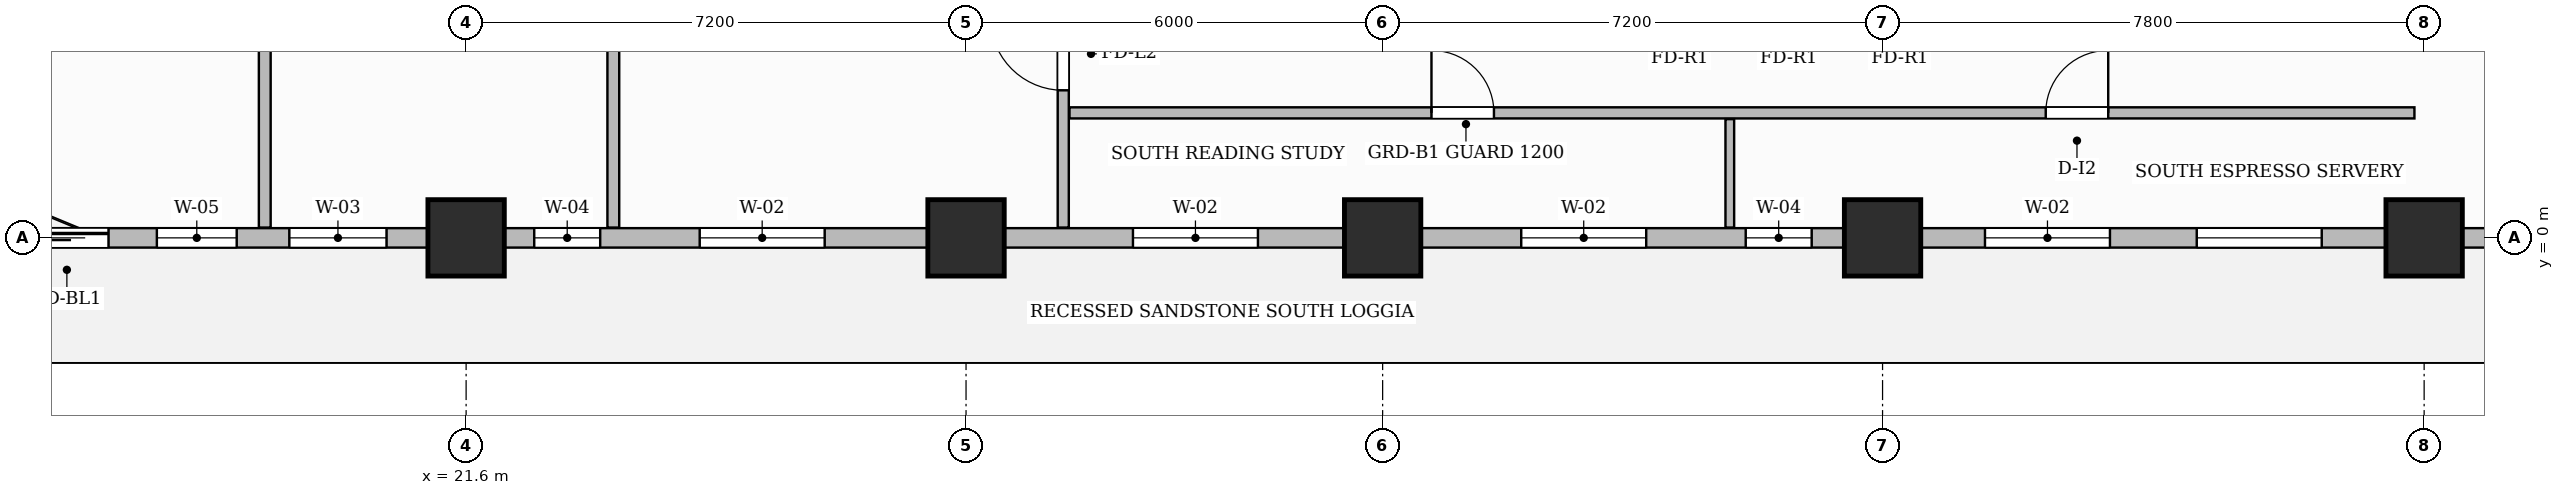
"""IFC4 building model, lengths in metres.
Left out: names, types, materials, properties, quantities, classifications, styles, units other than length and angle.
Written with IfcOpenShell. Run it as: python <this file> out.ifc"""

import sys

from ifc_helpers import new_model, si_unit, direction, frame, frame_2d, origin, origin_2d, place, context, subcontext, project, spatial, rectangle, extrude, source, transform, mapped, element, fill, save


model = new_model("IFC4")
c1 = context("Model", 3, precision=1e-05, world=origin(), true_north=direction((0.0, 1.0)))
c2 = subcontext(c1, "Body", "Model", "MODEL_VIEW")
j1 = project(units=[si_unit("LENGTHUNIT", "METRE"), si_unit("PLANEANGLEUNIT", "RADIAN")], contexts=[c1])
p1 = place(None, origin())
s1 = spatial("IfcSite", under=j1, at=p1, CompositionType="ELEMENT")
p2 = place(p1, origin())
s2 = spatial("IfcBuilding", under=s1, at=p2, CompositionType="ELEMENT")
p3 = place(p2, frame((0.0, 0.0, 95.3)))
s3 = spatial("IfcBuildingStorey", under=s2, at=p3, CompositionType="ELEMENT", Elevation=95.3)
m1 = source(origin(), c2, "Body", "SweptSolid", [
    extrude(rectangle(XDim=1.1, YDim=1.1, at=origin_2d()), origin(), (0.0, 0.0, 1.0), 3.7),
])
for number, where, z_axis, x_axis in (
    (1, (21.6, 0.0, 0.0), (0.0, 0.0, 1.0), (1.0, 0.0, 0.0)),
    (2, (28.8, 0.0, 0.0), (0.0, 0.0, 1.0), (1.0, 0.0, 0.0)),
    (3, (34.8, 0.0, 0.0), (0.0, 0.0, 1.0), (1.0, 0.0, 0.0)),
    (4, (42.0, 0.0, 0.0), (0.0, 0.0, 1.0), (1.0, 0.0, 0.0)),
    (5, (49.8, 0.0, 0.0), (0.0, 0.0, 1.0), (1.0, 0.0, 0.0)),
):
    element("IfcColumn", number, at=place(p3, frame(where, z_axis=z_axis, x_axis=x_axis)), inside=s3, PredefinedType="COLUMN", context=c2, shape_type="MappedRepresentation", body=[
        mapped(m1, transform((0.0, 0.0, 0.0), scale=1.0)),
    ])
p4 = place(p3, frame((30.2, 0.148, 0.0), z_axis=(0.0, 0.0, 1.0), x_axis=(0.0, 1.0, 0.0)))
e6 = element("IfcWall", 6, at=p4, inside=s3, PredefinedType="PARTITIONING", context=c2, shape_type="SweptSolid", body=[
    extrude(rectangle(XDim=8.912, YDim=0.16, at=frame_2d((4.456, 0.0))), origin(), (0.0, 0.0, 1.0), 3.45),
])
p5 = place(p4, frame((1.977, 0.0, 0.0)))
e7 = element("IfcOpeningElement", 7, at=p5, cuts=e6, PredefinedType="OPENING", context=c2, shape_type="SweptSolid", body=[
    extrude(rectangle(XDim=1.05, YDim=2.15, at=frame_2d((0.525, 1.075))), frame((0.0, 0.09, 0.0), z_axis=(0.0, -1.0, 0.0), x_axis=(1.0, 0.0, 0.0)), (0.0, 0.0, 1.0), 0.18),
])
p6 = place(p3, frame((30.29, 1.8, 0.0), z_axis=(0.0, 0.0, 1.0), x_axis=(1.0, 0.0, 0.0)))
e8 = element("IfcWall", 8, at=p6, inside=s3, PredefinedType="PARTITIONING", context=c2, shape_type="SweptSolid", body=[
    extrude(rectangle(XDim=19.37, YDim=0.16, at=frame_2d((9.685, 0.0))), origin(), (0.0, 0.0, 1.0), 3.45),
])
p7 = place(p6, frame((5.213, 0.0, 0.0)))
e9 = element("IfcOpeningElement", 9, at=p7, cuts=e8, PredefinedType="OPENING", context=c2, shape_type="SweptSolid", body=[
    extrude(rectangle(XDim=0.9, YDim=2.15, at=frame_2d((0.45, 1.075))), frame((0.0, 0.09, 0.0), z_axis=(0.0, -1.0, 0.0), x_axis=(1.0, 0.0, 0.0)), (0.0, 0.0, 1.0), 0.18),
])
p8 = place(p6, frame((14.06, 0.0, 0.0)))
e10 = element("IfcOpeningElement", 10, at=p8, cuts=e8, PredefinedType="OPENING", context=c2, shape_type="SweptSolid", body=[
    extrude(rectangle(XDim=0.9, YDim=2.15, at=frame_2d((0.45, 1.075))), frame((0.0, 0.09, 0.0), z_axis=(0.0, -1.0, 0.0), x_axis=(1.0, 0.0, 0.0)), (0.0, 0.0, 1.0), 0.18),
])
p9 = place(p3, frame((39.8, 0.148, 0.0), z_axis=(0.0, 0.0, 1.0), x_axis=(0.0, 1.0, 0.0)))
e11 = element("IfcWall", 11, at=p9, inside=s3, PredefinedType="PARTITIONING", context=c2, shape_type="SweptSolid", body=[
    extrude(rectangle(XDim=1.562, YDim=0.125, at=frame_2d((0.781, 0.0))), origin(), (0.0, 0.0, 1.0), 3.45),
])
for number, where, z_axis, x_axis in (
    (12, (18.7, 0.148, 0.0), (0.0, 0.0, 1.0), (0.0, 1.0, 0.0)),
    (13, (23.72, 0.148, 0.0), (0.0, 0.0, 1.0), (0.0, 1.0, 0.0)),
):
    element("IfcWall", number, at=place(p3, frame(where, z_axis=z_axis, x_axis=x_axis)), inside=s3, PredefinedType="PARTITIONING", context=c2, shape_type="SweptSolid", body=[
        extrude(rectangle(XDim=8.912, YDim=0.17, at=frame_2d((4.456, 0.0))), origin(), (0.0, 0.0, 1.0), 3.45),
    ])
p10 = place(p3, frame((14.4, 0.0, 0.0), z_axis=(0.0, 0.0, 1.0), x_axis=(1.0, 0.0, 0.0)))
e14 = element("IfcWall", 14, at=p10, inside=s3, PredefinedType="SOLIDWALL", context=c2, shape_type="SweptSolid", body=[
    extrude(rectangle(XDim=43.2, YDim=0.28, at=frame_2d((21.6, 0.0))), origin(), (0.0, 0.0, 1.0), 2.885),
])
p11 = place(p10, frame((0.85, 0.0, 0.0)))
e15 = element("IfcOpeningElement", 15, at=p11, cuts=e14, PredefinedType="OPENING", context=c2, shape_type="SweptSolid", body=[
    extrude(rectangle(XDim=1.2, YDim=2.2, at=frame_2d((0.6, 1.1))), frame((0.0, 0.15, 0.0), z_axis=(0.0, -1.0, 0.0), x_axis=(1.0, 0.0, 0.0)), (0.0, 0.0, 1.0), 0.3),
])
p12 = place(p10, frame((2.746, 0.0, 0.8)))
e16 = element("IfcOpeningElement", 16, at=p12, cuts=e14, PredefinedType="OPENING", context=c2, shape_type="SweptSolid", body=[
    extrude(rectangle(XDim=1.15, YDim=1.8, at=frame_2d((0.575, 0.9))), frame((0.0, 0.15, 0.0), z_axis=(0.0, -1.0, 0.0), x_axis=(1.0, 0.0, 0.0)), (0.0, 0.0, 1.0), 0.3),
])
p13 = place(p10, frame((4.654, 0.0, 0.8)))
e17 = element("IfcOpeningElement", 17, at=p13, cuts=e14, PredefinedType="OPENING", context=c2, shape_type="SweptSolid", body=[
    extrude(rectangle(XDim=1.4, YDim=1.85, at=frame_2d((0.7, 0.925))), frame((0.0, 0.15, 0.0), z_axis=(0.0, -1.0, 0.0), x_axis=(1.0, 0.0, 0.0)), (0.0, 0.0, 1.0), 0.3),
])
p14 = place(p10, frame((8.181, 0.0, 0.8)))
e18 = element("IfcOpeningElement", 18, at=p14, cuts=e14, PredefinedType="OPENING", context=c2, shape_type="SweptSolid", body=[
    extrude(rectangle(XDim=0.95, YDim=1.75, at=frame_2d((0.475, 0.875))), frame((0.0, 0.15, 0.0), z_axis=(0.0, -1.0, 0.0), x_axis=(1.0, 0.0, 0.0)), (0.0, 0.0, 1.0), 0.3),
])
p15 = place(p10, frame((10.564, 0.0, 0.8)))
e19 = element("IfcOpeningElement", 19, at=p15, cuts=e14, PredefinedType="OPENING", context=c2, shape_type="SweptSolid", body=[
    extrude(rectangle(XDim=1.8, YDim=1.85, at=frame_2d((0.9, 0.925))), frame((0.0, 0.15, 0.0), z_axis=(0.0, -1.0, 0.0), x_axis=(1.0, 0.0, 0.0)), (0.0, 0.0, 1.0), 0.3),
])
p16 = place(p10, frame((16.804, 0.0, 0.8)))
e20 = element("IfcOpeningElement", 20, at=p16, cuts=e14, PredefinedType="OPENING", context=c2, shape_type="SweptSolid", body=[
    extrude(rectangle(XDim=1.8, YDim=1.85, at=frame_2d((0.9, 0.925))), frame((0.0, 0.15, 0.0), z_axis=(0.0, -1.0, 0.0), x_axis=(1.0, 0.0, 0.0)), (0.0, 0.0, 1.0), 0.3),
])
p17 = place(p10, frame((22.396, 0.0, 0.8)))
e21 = element("IfcOpeningElement", 21, at=p17, cuts=e14, PredefinedType="OPENING", context=c2, shape_type="SweptSolid", body=[
    extrude(rectangle(XDim=1.8, YDim=1.85, at=frame_2d((0.9, 0.925))), frame((0.0, 0.15, 0.0), z_axis=(0.0, -1.0, 0.0), x_axis=(1.0, 0.0, 0.0)), (0.0, 0.0, 1.0), 0.3),
])
p18 = place(p10, frame((25.629, 0.0, 0.8)))
e22 = element("IfcOpeningElement", 22, at=p18, cuts=e14, PredefinedType="OPENING", context=c2, shape_type="SweptSolid", body=[
    extrude(rectangle(XDim=0.95, YDim=1.75, at=frame_2d((0.475, 0.875))), frame((0.0, 0.15, 0.0), z_axis=(0.0, -1.0, 0.0), x_axis=(1.0, 0.0, 0.0)), (0.0, 0.0, 1.0), 0.3),
])
p19 = place(p10, frame((29.075, 0.0, 0.8)))
e23 = element("IfcOpeningElement", 23, at=p19, cuts=e14, PredefinedType="OPENING", context=c2, shape_type="SweptSolid", body=[
    extrude(rectangle(XDim=1.8, YDim=1.85, at=frame_2d((0.9, 0.925))), frame((0.0, 0.15, 0.0), z_axis=(0.0, -1.0, 0.0), x_axis=(1.0, 0.0, 0.0)), (0.0, 0.0, 1.0), 0.3),
])
p20 = place(p10, frame((32.125, 0.0, 0.8)))
e24 = element("IfcOpeningElement", 24, at=p20, cuts=e14, PredefinedType="OPENING", context=c2, shape_type="SweptSolid", body=[
    extrude(rectangle(XDim=1.8, YDim=1.85, at=frame_2d((0.9, 0.925))), frame((0.0, 0.15, 0.0), z_axis=(0.0, -1.0, 0.0), x_axis=(1.0, 0.0, 0.0)), (0.0, 0.0, 1.0), 0.3),
])
p21 = place(p10, frame((36.946, 0.0, 0.8)))
e25 = element("IfcOpeningElement", 25, at=p21, cuts=e14, PredefinedType="OPENING", context=c2, shape_type="SweptSolid", body=[
    extrude(rectangle(XDim=1.8, YDim=1.85, at=frame_2d((0.9, 0.925))), frame((0.0, 0.15, 0.0), z_axis=(0.0, -1.0, 0.0), x_axis=(1.0, 0.0, 0.0)), (0.0, 0.0, 1.0), 0.3),
])
p22 = place(p10, frame((40.054, 0.0, 0.8)))
e26 = element("IfcOpeningElement", 26, at=p22, cuts=e14, PredefinedType="OPENING", context=c2, shape_type="SweptSolid", body=[
    extrude(rectangle(XDim=1.8, YDim=1.85, at=frame_2d((0.9, 0.925))), frame((0.0, 0.15, 0.0), z_axis=(0.0, -1.0, 0.0), x_axis=(1.0, 0.0, 0.0)), (0.0, 0.0, 1.0), 0.3),
])
m2 = source(origin(), c2, "Body", "SweptSolid", [
    extrude(rectangle(XDim=1.05, YDim=2.15, at=frame_2d((0.525, 1.075))), frame((0.0, 0.025, 0.0), z_axis=(0.0, -1.0, 0.0), x_axis=(1.0, 0.0, 0.0)), (0.0, 0.0, 1.0), 0.05),
])
p23 = place(p5, origin())
e27 = element("IfcDoor", 27, at=p23, inside=s3, OperationType="SINGLE_SWING_RIGHT", PredefinedType="DOOR", context=c2, shape_type="MappedRepresentation", body=[
    mapped(m2, transform((0.0, 0.0, 0.0), scale=1.0)),
])
fill(e7, e27)
m3 = source(origin(), c2, "Body", "SweptSolid", [
    extrude(rectangle(XDim=0.9, YDim=2.15, at=frame_2d((0.45, 1.075))), frame((0.0, 0.025, 0.0), z_axis=(0.0, -1.0, 0.0), x_axis=(1.0, 0.0, 0.0)), (0.0, 0.0, 1.0), 0.05),
])
p24 = place(p7, origin())
e28 = element("IfcDoor", 28, at=p24, inside=s3, OperationType="SINGLE_SWING_LEFT", PredefinedType="DOOR", context=c2, shape_type="MappedRepresentation", body=[
    mapped(m3, transform((0.0, 0.0, 0.0), scale=1.0)),
])
fill(e9, e28)
p25 = place(p8, origin())
e29 = element("IfcDoor", 29, at=p25, inside=s3, OperationType="SINGLE_SWING_RIGHT", PredefinedType="DOOR", context=c2, shape_type="MappedRepresentation", body=[
    mapped(m3, transform((0.0, 0.0, 0.0), scale=1.0)),
])
fill(e10, e29)
m4 = source(origin(), c2, "Body", "SweptSolid", [
    extrude(rectangle(XDim=1.2, YDim=2.2, at=frame_2d((0.6, 1.1))), frame((0.0, 0.025, 0.0), z_axis=(0.0, -1.0, 0.0), x_axis=(1.0, 0.0, 0.0)), (0.0, 0.0, 1.0), 0.05),
])
p26 = place(p11, origin())
e30 = element("IfcDoor", 30, at=p26, inside=s3, OperationType="SLIDING_TO_LEFT", PredefinedType="DOOR", context=c2, shape_type="MappedRepresentation", body=[
    mapped(m4, transform((0.0, 0.0, 0.0), scale=1.0)),
])
fill(e15, e30)
m5 = source(origin(), c2, "Body", "SweptSolid", [
    extrude(rectangle(XDim=1.15, YDim=1.8, at=frame_2d((0.575, 0.9))), frame((0.0, 0.03, 0.0), z_axis=(0.0, -1.0, 0.0), x_axis=(1.0, 0.0, 0.0)), (0.0, 0.0, 1.0), 0.06),
])
p27 = place(p12, origin())
e31 = element("IfcWindow", 31, at=p27, inside=s3, PartitioningType="SINGLE_PANEL", PredefinedType="WINDOW", context=c2, shape_type="MappedRepresentation", body=[
    mapped(m5, transform((0.0, 0.0, 0.0), scale=1.0)),
])
fill(e16, e31)
m6 = source(origin(), c2, "Body", "SweptSolid", [
    extrude(rectangle(XDim=1.4, YDim=1.85, at=frame_2d((0.7, 0.925))), frame((0.0, 0.03, 0.0), z_axis=(0.0, -1.0, 0.0), x_axis=(1.0, 0.0, 0.0)), (0.0, 0.0, 1.0), 0.06),
])
p28 = place(p13, origin())
e32 = element("IfcWindow", 32, at=p28, inside=s3, PartitioningType="SINGLE_PANEL", PredefinedType="WINDOW", context=c2, shape_type="MappedRepresentation", body=[
    mapped(m6, transform((0.0, 0.0, 0.0), scale=1.0)),
])
fill(e17, e32)
m7 = source(origin(), c2, "Body", "SweptSolid", [
    extrude(rectangle(XDim=0.95, YDim=1.75, at=frame_2d((0.475, 0.875))), frame((0.0, 0.03, 0.0), z_axis=(0.0, -1.0, 0.0), x_axis=(1.0, 0.0, 0.0)), (0.0, 0.0, 1.0), 0.06),
])
p29 = place(p14, origin())
e33 = element("IfcWindow", 33, at=p29, inside=s3, PartitioningType="SINGLE_PANEL", PredefinedType="WINDOW", context=c2, shape_type="MappedRepresentation", body=[
    mapped(m7, transform((0.0, 0.0, 0.0), scale=1.0)),
])
fill(e18, e33)
m8 = source(origin(), c2, "Body", "SweptSolid", [
    extrude(rectangle(XDim=1.8, YDim=1.85, at=frame_2d((0.9, 0.925))), frame((0.0, 0.03, 0.0), z_axis=(0.0, -1.0, 0.0), x_axis=(1.0, 0.0, 0.0)), (0.0, 0.0, 1.0), 0.06),
])
p30 = place(p15, origin())
e34 = element("IfcWindow", 34, at=p30, inside=s3, PartitioningType="DOUBLE_PANEL_VERTICAL", PredefinedType="WINDOW", context=c2, shape_type="MappedRepresentation", body=[
    mapped(m8, transform((0.0, 0.0, 0.0), scale=1.0)),
])
fill(e19, e34)
p31 = place(p16, origin())
e35 = element("IfcWindow", 35, at=p31, inside=s3, PartitioningType="DOUBLE_PANEL_VERTICAL", PredefinedType="WINDOW", context=c2, shape_type="MappedRepresentation", body=[
    mapped(m8, transform((0.0, 0.0, 0.0), scale=1.0)),
])
fill(e20, e35)
p32 = place(p17, origin())
e36 = element("IfcWindow", 36, at=p32, inside=s3, PartitioningType="DOUBLE_PANEL_VERTICAL", PredefinedType="WINDOW", context=c2, shape_type="MappedRepresentation", body=[
    mapped(m8, transform((0.0, 0.0, 0.0), scale=1.0)),
])
fill(e21, e36)
p33 = place(p18, origin())
e37 = element("IfcWindow", 37, at=p33, inside=s3, PartitioningType="SINGLE_PANEL", PredefinedType="WINDOW", context=c2, shape_type="MappedRepresentation", body=[
    mapped(m7, transform((0.0, 0.0, 0.0), scale=1.0)),
])
fill(e22, e37)
p34 = place(p19, origin())
e38 = element("IfcWindow", 38, at=p34, inside=s3, PartitioningType="DOUBLE_PANEL_VERTICAL", PredefinedType="WINDOW", context=c2, shape_type="MappedRepresentation", body=[
    mapped(m8, transform((0.0, 0.0, 0.0), scale=1.0)),
])
fill(e23, e38)
p35 = place(p20, origin())
e39 = element("IfcWindow", 39, at=p35, inside=s3, PartitioningType="DOUBLE_PANEL_VERTICAL", PredefinedType="WINDOW", context=c2, shape_type="MappedRepresentation", body=[
    mapped(m8, transform((0.0, 0.0, 0.0), scale=1.0)),
])
fill(e24, e39)
save(model, sys.argv[1])
